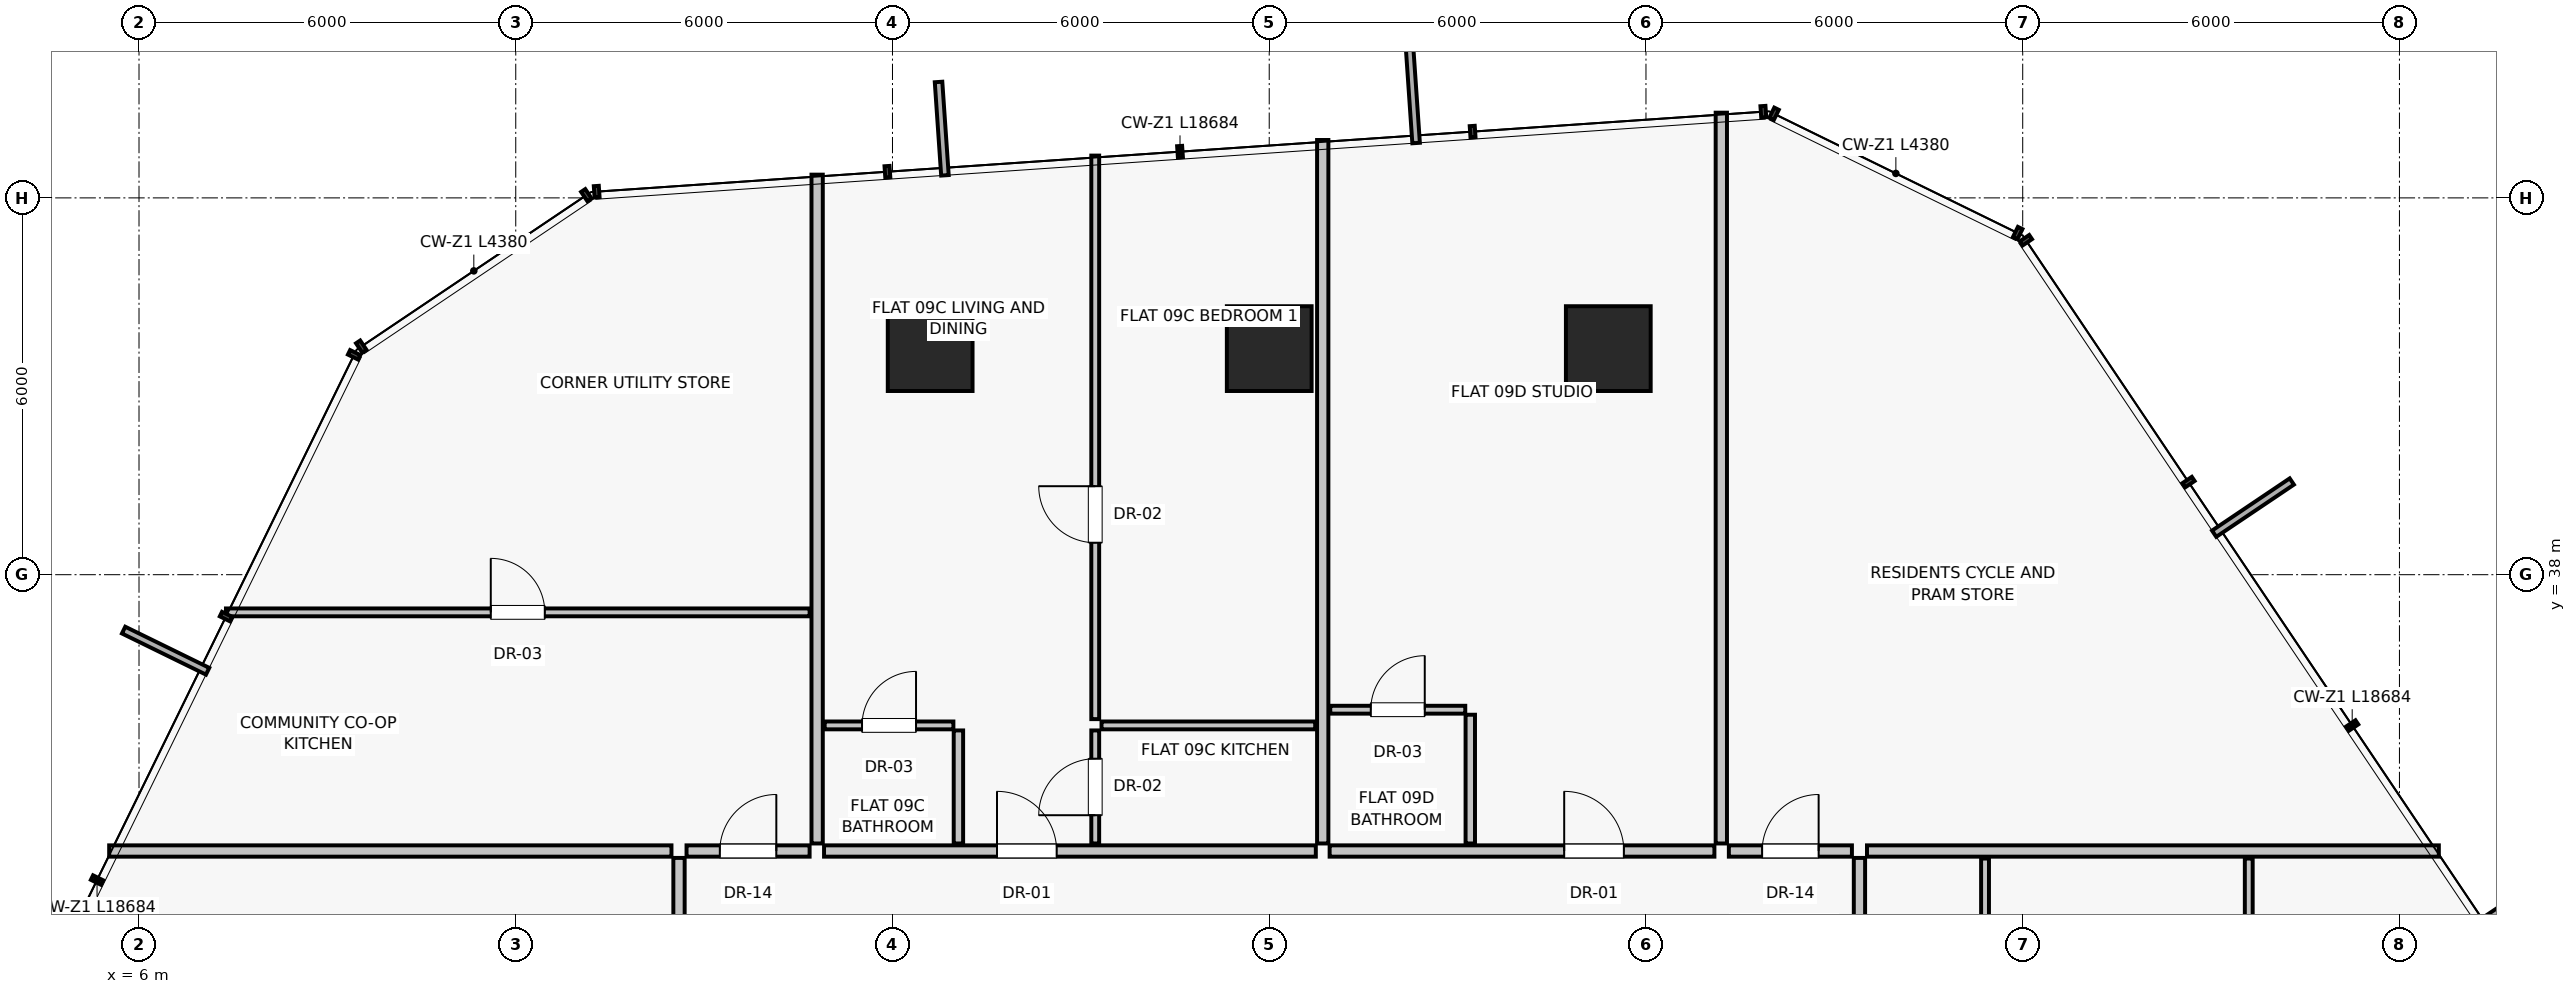
"""IFC4 building model, lengths in metres.
Left out: names, types, materials, properties, quantities, classifications, styles, units other than length and angle.
Written with IfcOpenShell. Run it as: python <this file> out.ifc"""

import sys

from ifc_helpers import new_model, si_unit, direction, frame, frame_2d, origin, origin_2d, place, context, subcontext, project, spatial, rectangle, extrude, source, transform, mapped, element, fill, save


model = new_model("IFC4")
c1 = context("Model", 3, precision=1e-05, world=origin(), true_north=direction((0.0, 1.0)))
c2 = subcontext(c1, "Body", "Model", "MODEL_VIEW")
j1 = project(units=[si_unit("LENGTHUNIT", "METRE"), si_unit("PLANEANGLEUNIT", "RADIAN")], contexts=[c1])
p1 = place(None, origin())
s1 = spatial("IfcSite", under=j1, at=p1, CompositionType="ELEMENT")
p2 = place(p1, origin())
s2 = spatial("IfcBuilding", under=s1, at=p2, CompositionType="ELEMENT")
p3 = place(p2, frame((0.0, 0.0, 37.05)))
s3 = spatial("IfcBuildingStorey", under=s2, at=p3, CompositionType="ELEMENT", Elevation=37.05)
for number, where, z_axis, x_axis in (
    (1, (29.4, 41.6, 0.0), (0.0, 0.0, 1.0), (1.0, 0.0, 0.0)),
    (2, (24.0, 41.6, 0.0), (0.0, 0.0, 1.0), (1.0, 0.0, 0.0)),
    (3, (18.6, 41.6, 0.0), (0.0, 0.0, 1.0), (1.0, 0.0, 0.0)),
):
    element("IfcColumn", number, at=place(p3, frame(where, z_axis=z_axis, x_axis=x_axis)), inside=s3, PredefinedType="COLUMN", context=c2, shape_type="SweptSolid", body=[
        extrude(rectangle(XDim=1.35, YDim=1.35, at=origin_2d()), origin(), (0.0, 0.0, 1.0), 3.25),
    ])
p4 = place(p3, frame((16.8, 33.72, 0.0), z_axis=(0.0, 0.0, 1.0), x_axis=(0.0, 1.0, 0.0)))
e4 = element("IfcWall", 4, at=p4, inside=s3, PredefinedType="PARTITIONING", context=c2, shape_type="SweptSolid", body=[
    extrude(rectangle(XDim=10.65, YDim=0.18, at=frame_2d((5.325, 0.0))), origin(), (0.0, 0.0, 1.0), 3.0),
])
p5 = place(p3, frame((31.2, 33.72, 0.0), z_axis=(0.0, 0.0, 1.0), x_axis=(0.0, 1.0, 0.0)))
e5 = element("IfcWall", 5, at=p5, inside=s3, PredefinedType="PARTITIONING", context=c2, shape_type="SweptSolid", body=[
    extrude(rectangle(XDim=11.637, YDim=0.18, at=frame_2d((5.818, 0.0))), origin(), (0.0, 0.0, 1.0), 3.0),
])
p6 = place(p3, frame((16.91, 33.6, 0.0), z_axis=(0.0, 0.0, 1.0), x_axis=(1.0, 0.0, 0.0)))
e6 = element("IfcWall", 6, at=p6, inside=s3, PredefinedType="PARTITIONING", context=c2, shape_type="SweptSolid", body=[
    extrude(rectangle(XDim=7.832, YDim=0.18, at=frame_2d((3.916, 0.0))), origin(), (0.0, 0.0, 1.0), 3.0),
])
p7 = place(p6, frame((2.754, 0.0, 0.0)))
e7 = element("IfcOpeningElement", 7, at=p7, cuts=e6, PredefinedType="OPENING", context=c2, shape_type="SweptSolid", body=[
    extrude(rectangle(XDim=0.95, YDim=2.02, at=frame_2d((0.475, 1.01))), frame((0.0, 0.1, 0.0), z_axis=(0.0, -1.0, 0.0), x_axis=(1.0, 0.0, 0.0)), (0.0, 0.0, 1.0), 0.2),
])
p8 = place(p3, frame((19.05, 33.72, 0.0), z_axis=(0.0, 0.0, 1.0), x_axis=(0.0, 1.0, 0.0)))
e8 = element("IfcWall", 8, at=p8, inside=s3, PredefinedType="PARTITIONING", context=c2, shape_type="SweptSolid", body=[
    extrude(rectangle(XDim=1.8, YDim=0.15, at=frame_2d((0.9, 0.0))), origin(), (0.0, 0.0, 1.0), 3.0),
])
p9 = place(p3, frame((16.92, 35.6, 0.0), z_axis=(0.0, 0.0, 1.0), x_axis=(1.0, 0.0, 0.0)))
e9 = element("IfcWall", 9, at=p9, inside=s3, PredefinedType="PARTITIONING", context=c2, shape_type="SweptSolid", body=[
    extrude(rectangle(XDim=2.05, YDim=0.125, at=frame_2d((1.025, 0.0))), origin(), (0.0, 0.0, 1.0), 3.0),
])
p10 = place(p9, frame((0.595, 0.0, 0.0)))
e10 = element("IfcOpeningElement", 10, at=p10, cuts=e9, PredefinedType="OPENING", context=c2, shape_type="SweptSolid", body=[
    extrude(rectangle(XDim=0.86, YDim=2.01, at=frame_2d((0.43, 1.005))), frame((0.0, 0.073, 0.0), z_axis=(0.0, -1.0, 0.0), x_axis=(1.0, 0.0, 0.0)), (0.0, 0.0, 1.0), 0.145),
])
p11 = place(p3, frame((21.229, 33.72, 0.0), z_axis=(0.0, 0.0, 1.0), x_axis=(0.0, 1.0, 0.0)))
e11 = element("IfcWall", 11, at=p11, inside=s3, PredefinedType="PARTITIONING", context=c2, shape_type="SweptSolid", body=[
    extrude(rectangle(XDim=1.8, YDim=0.125, at=frame_2d((0.9, 0.0))), origin(), (0.0, 0.0, 1.0), 3.0),
])
p12 = place(p11, frame((0.45, 0.0, 0.0)))
e12 = element("IfcOpeningElement", 12, at=p12, cuts=e11, PredefinedType="OPENING", context=c2, shape_type="SweptSolid", body=[
    extrude(rectangle(XDim=0.9, YDim=2.01, at=frame_2d((0.45, 1.005))), frame((0.0, 0.073, 0.0), z_axis=(0.0, -1.0, 0.0), x_axis=(1.0, 0.0, 0.0)), (0.0, 0.0, 1.0), 0.145),
])
p13 = place(p3, frame((21.329, 35.6, 0.0), z_axis=(0.0, 0.0, 1.0), x_axis=(1.0, 0.0, 0.0)))
e13 = element("IfcWall", 13, at=p13, inside=s3, PredefinedType="PARTITIONING", context=c2, shape_type="SweptSolid", body=[
    extrude(rectangle(XDim=3.403, YDim=0.125, at=frame_2d((1.701, 0.0))), origin(), (0.0, 0.0, 1.0), 3.0),
])
p14 = place(p3, frame((21.229, 35.7, 0.0), z_axis=(0.0, 0.0, 1.0), x_axis=(0.0, 1.0, 0.0)))
e14 = element("IfcWall", 14, at=p14, inside=s3, PredefinedType="PARTITIONING", context=c2, shape_type="SweptSolid", body=[
    extrude(rectangle(XDim=8.974, YDim=0.125, at=frame_2d((4.487, 0.0))), origin(), (0.0, 0.0, 1.0), 3.0),
])
p15 = place(p14, frame((2.809, 0.0, 0.0)))
e15 = element("IfcOpeningElement", 15, at=p15, cuts=e14, PredefinedType="OPENING", context=c2, shape_type="SweptSolid", body=[
    extrude(rectangle(XDim=0.9, YDim=2.01, at=frame_2d((0.45, 1.005))), frame((0.0, 0.073, 0.0), z_axis=(0.0, -1.0, 0.0), x_axis=(1.0, 0.0, 0.0)), (0.0, 0.0, 1.0), 0.145),
])
p16 = place(p3, frame((24.852, 33.72, 0.0), z_axis=(0.0, 0.0, 1.0), x_axis=(0.0, 1.0, 0.0)))
e16 = element("IfcWall", 16, at=p16, inside=s3, PredefinedType="PARTITIONING", context=c2, shape_type="SweptSolid", body=[
    extrude(rectangle(XDim=11.202, YDim=0.18, at=frame_2d((5.601, 0.0))), origin(), (0.0, 0.0, 1.0), 3.0),
])
p17 = place(p3, frame((24.962, 33.6, 0.0), z_axis=(0.0, 0.0, 1.0), x_axis=(1.0, 0.0, 0.0)))
e17 = element("IfcWall", 17, at=p17, inside=s3, PredefinedType="PARTITIONING", context=c2, shape_type="SweptSolid", body=[
    extrude(rectangle(XDim=6.128, YDim=0.18, at=frame_2d((3.064, 0.0))), origin(), (0.0, 0.0, 1.0), 3.0),
])
p18 = place(p17, frame((3.736, 0.0, 0.0)))
e18 = element("IfcOpeningElement", 18, at=p18, cuts=e17, PredefinedType="OPENING", context=c2, shape_type="SweptSolid", body=[
    extrude(rectangle(XDim=0.95, YDim=2.02, at=frame_2d((0.475, 1.01))), frame((0.0, 0.1, 0.0), z_axis=(0.0, -1.0, 0.0), x_axis=(1.0, 0.0, 0.0)), (0.0, 0.0, 1.0), 0.2),
])
p19 = place(p3, frame((27.202, 33.72, 0.0), z_axis=(0.0, 0.0, 1.0), x_axis=(0.0, 1.0, 0.0)))
e19 = element("IfcWall", 19, at=p19, inside=s3, PredefinedType="PARTITIONING", context=c2, shape_type="SweptSolid", body=[
    extrude(rectangle(XDim=2.05, YDim=0.15, at=frame_2d((1.025, 0.0))), origin(), (0.0, 0.0, 1.0), 3.0),
])
p20 = place(p3, frame((24.972, 35.85, 0.0), z_axis=(0.0, 0.0, 1.0), x_axis=(1.0, 0.0, 0.0)))
e20 = element("IfcWall", 20, at=p20, inside=s3, PredefinedType="PARTITIONING", context=c2, shape_type="SweptSolid", body=[
    extrude(rectangle(XDim=2.15, YDim=0.125, at=frame_2d((1.075, 0.0))), origin(), (0.0, 0.0, 1.0), 3.0),
])
p21 = place(p20, frame((0.645, 0.0, 0.0)))
e21 = element("IfcOpeningElement", 21, at=p21, cuts=e20, PredefinedType="OPENING", context=c2, shape_type="SweptSolid", body=[
    extrude(rectangle(XDim=0.86, YDim=2.01, at=frame_2d((0.43, 1.005))), frame((0.0, 0.073, 0.0), z_axis=(0.0, -1.0, 0.0), x_axis=(1.0, 0.0, 0.0)), (0.0, 0.0, 1.0), 0.145),
])
p22 = place(p3, frame((14.48, 33.6, 0.0), z_axis=(0.0, 0.0, 1.0), x_axis=(-1.0, 0.0, 0.0)))
e22 = element("IfcWall", 22, at=p22, inside=s3, PredefinedType="PARTITIONING", context=c2, shape_type="SweptSolid", body=[
    extrude(rectangle(XDim=8.955, YDim=0.18, at=frame_2d((4.478, 0.0))), origin(), (0.0, 0.0, 1.0), 3.0),
])
p23 = place(p3, frame((14.6, 28.073, 0.0), z_axis=(0.0, 0.0, 1.0), x_axis=(0.0, 1.0, 0.0)))
e23 = element("IfcWall", 23, at=p23, inside=s3, PredefinedType="PARTITIONING", context=c2, shape_type="SweptSolid", body=[
    extrude(rectangle(XDim=5.417, YDim=0.18, at=frame_2d((2.708, 0.0))), origin(), (0.0, 0.0, 1.0), 3.0),
])
p24 = place(p23, frame((2.208, 0.0, 0.0)))
e24 = element("IfcOpeningElement", 24, at=p24, cuts=e23, PredefinedType="OPENING", context=c2, shape_type="SweptSolid", body=[
    extrude(rectangle(XDim=1.0, YDim=2.01, at=frame_2d((0.5, 1.005))), frame((0.0, 0.1, 0.0), z_axis=(0.0, -1.0, 0.0), x_axis=(1.0, 0.0, 0.0)), (0.0, 0.0, 1.0), 0.2),
])
p25 = place(p3, frame((33.52, 33.6, 0.0), z_axis=(0.0, 0.0, 1.0), x_axis=(1.0, 0.0, 0.0)))
e25 = element("IfcWall", 25, at=p25, inside=s3, PredefinedType="PARTITIONING", context=c2, shape_type="SweptSolid", body=[
    extrude(rectangle(XDim=9.107, YDim=0.18, at=frame_2d((4.554, 0.0))), origin(), (0.0, 0.0, 1.0), 3.0),
])
p26 = place(p3, frame((33.4, 24.618, 0.0), z_axis=(0.0, 0.0, 1.0), x_axis=(0.0, 1.0, 0.0)))
e26 = element("IfcWall", 26, at=p26, inside=s3, PredefinedType="PARTITIONING", context=c2, shape_type="SweptSolid", body=[
    extrude(rectangle(XDim=8.872, YDim=0.18, at=frame_2d((4.436, 0.0))), origin(), (0.0, 0.0, 1.0), 3.0),
])
p27 = place(p26, frame((2.995, 0.0, 0.0)))
e27 = element("IfcOpeningElement", 27, at=p27, cuts=e26, PredefinedType="OPENING", context=c2, shape_type="SweptSolid", body=[
    extrude(rectangle(XDim=0.95, YDim=2.02, at=frame_2d((0.475, 1.01))), frame((0.0, 0.1, 0.0), z_axis=(0.0, -1.0, 0.0), x_axis=(1.0, 0.0, 0.0)), (0.0, 0.0, 1.0), 0.2),
])
for number, where, z_axis, x_axis in (
    (28, (35.4, 29.518, 0.0), (0.0, 0.0, 1.0), (0.0, 1.0, 0.0)),
    (29, (39.6, 29.518, 0.0), (0.0, 0.0, 1.0), (0.0, 1.0, 0.0)),
):
    element("IfcWall", number, at=place(p3, frame(where, z_axis=z_axis, x_axis=x_axis)), inside=s3, PredefinedType="PARTITIONING", context=c2, shape_type="SweptSolid", body=[
        extrude(rectangle(XDim=3.962, YDim=0.125, at=frame_2d((1.981, 0.0))), origin(), (0.0, 0.0, 1.0), 3.0),
    ])
p28 = place(p3, frame((14.72, 33.6, 0.0), z_axis=(0.0, 0.0, 1.0), x_axis=(1.0, 0.0, 0.0)))
e30 = element("IfcWall", 30, at=p28, inside=s3, PredefinedType="PARTITIONING", context=c2, shape_type="SweptSolid", body=[
    extrude(rectangle(XDim=1.96, YDim=0.18, at=frame_2d((0.98, 0.0))), origin(), (0.0, 0.0, 1.0), 3.0),
])
p29 = place(p28, frame((0.53, 0.0, 0.0)))
e31 = element("IfcOpeningElement", 31, at=p29, cuts=e30, PredefinedType="OPENING", context=c2, shape_type="SweptSolid", body=[
    extrude(rectangle(XDim=0.9, YDim=2.01, at=frame_2d((0.45, 1.005))), frame((0.0, 0.1, 0.0), z_axis=(0.0, -1.0, 0.0), x_axis=(1.0, 0.0, 0.0)), (0.0, 0.0, 1.0), 0.2),
])
p30 = place(p3, frame((7.385, 37.4, 0.0), z_axis=(0.0, 0.0, 1.0), x_axis=(1.0, 0.0, 0.0)))
e32 = element("IfcWall", 32, at=p30, inside=s3, PredefinedType="PARTITIONING", context=c2, shape_type="SweptSolid", body=[
    extrude(rectangle(XDim=9.295, YDim=0.125, at=frame_2d((4.648, 0.0))), origin(), (0.0, 0.0, 1.0), 3.0),
])
p31 = place(p30, frame((4.218, 0.0, 0.0)))
e33 = element("IfcOpeningElement", 33, at=p31, cuts=e32, PredefinedType="OPENING", context=c2, shape_type="SweptSolid", body=[
    extrude(rectangle(XDim=0.86, YDim=2.01, at=frame_2d((0.43, 1.005))), frame((0.0, 0.073, 0.0), z_axis=(0.0, -1.0, 0.0), x_axis=(1.0, 0.0, 0.0)), (0.0, 0.0, 1.0), 0.145),
])
p32 = place(p3, frame((31.32, 33.6, 0.0), z_axis=(0.0, 0.0, 1.0), x_axis=(1.0, 0.0, 0.0)))
e34 = element("IfcWall", 34, at=p32, inside=s3, PredefinedType="PARTITIONING", context=c2, shape_type="SweptSolid", body=[
    extrude(rectangle(XDim=1.96, YDim=0.18, at=frame_2d((0.98, 0.0))), origin(), (0.0, 0.0, 1.0), 3.0),
])
p33 = place(p32, frame((0.53, 0.0, 0.0)))
e35 = element("IfcOpeningElement", 35, at=p33, cuts=e34, PredefinedType="OPENING", context=c2, shape_type="SweptSolid", body=[
    extrude(rectangle(XDim=0.9, YDim=2.01, at=frame_2d((0.45, 1.005))), frame((0.0, 0.1, 0.0), z_axis=(0.0, -1.0, 0.0), x_axis=(1.0, 0.0, 0.0)), (0.0, 0.0, 1.0), 0.2),
])
m1 = source(origin(), c2, "Body", "SweptSolid", [
    extrude(rectangle(XDim=0.95, YDim=2.02, at=frame_2d((0.475, 1.01))), frame((0.0, 0.025, 0.0), z_axis=(0.0, -1.0, 0.0), x_axis=(1.0, 0.0, 0.0)), (0.0, 0.0, 1.0), 0.05),
])
p34 = place(p7, origin())
e36 = element("IfcDoor", 36, at=p34, inside=s3, OperationType="SINGLE_SWING_LEFT", PredefinedType="DOOR", context=c2, shape_type="MappedRepresentation", body=[
    mapped(m1, transform((0.0, 0.0, 0.0), scale=1.0)),
])
fill(e7, e36)
m2 = source(origin(), c2, "Body", "SweptSolid", [
    extrude(rectangle(XDim=0.86, YDim=2.01, at=frame_2d((0.43, 1.005))), frame((0.0, 0.025, 0.0), z_axis=(0.0, -1.0, 0.0), x_axis=(1.0, 0.0, 0.0)), (0.0, 0.0, 1.0), 0.05),
])
p35 = place(p10, origin())
e37 = element("IfcDoor", 37, at=p35, inside=s3, OperationType="SINGLE_SWING_RIGHT", PredefinedType="DOOR", context=c2, shape_type="MappedRepresentation", body=[
    mapped(m2, transform((0.0, 0.0, 0.0), scale=1.0)),
])
fill(e10, e37)
m3 = source(origin(), c2, "Body", "SweptSolid", [
    extrude(rectangle(XDim=0.9, YDim=2.01, at=frame_2d((0.45, 1.005))), frame((0.0, 0.025, 0.0), z_axis=(0.0, -1.0, 0.0), x_axis=(1.0, 0.0, 0.0)), (0.0, 0.0, 1.0), 0.05),
])
p36 = place(p12, origin())
e38 = element("IfcDoor", 38, at=p36, inside=s3, OperationType="SINGLE_SWING_LEFT", PredefinedType="DOOR", context=c2, shape_type="MappedRepresentation", body=[
    mapped(m3, transform((0.0, 0.0, 0.0), scale=1.0)),
])
fill(e12, e38)
p37 = place(p15, origin())
e39 = element("IfcDoor", 39, at=p37, inside=s3, OperationType="SINGLE_SWING_RIGHT", PredefinedType="DOOR", context=c2, shape_type="MappedRepresentation", body=[
    mapped(m3, transform((0.0, 0.0, 0.0), scale=1.0)),
])
fill(e15, e39)
p38 = place(p18, origin())
e40 = element("IfcDoor", 40, at=p38, inside=s3, OperationType="SINGLE_SWING_LEFT", PredefinedType="DOOR", context=c2, shape_type="MappedRepresentation", body=[
    mapped(m1, transform((0.0, 0.0, 0.0), scale=1.0)),
])
fill(e18, e40)
p39 = place(p21, origin())
e41 = element("IfcDoor", 41, at=p39, inside=s3, OperationType="SINGLE_SWING_RIGHT", PredefinedType="DOOR", context=c2, shape_type="MappedRepresentation", body=[
    mapped(m2, transform((0.0, 0.0, 0.0), scale=1.0)),
])
fill(e21, e41)
p40 = place(p29, origin())
e42 = element("IfcDoor", 42, at=p40, inside=s3, OperationType="SINGLE_SWING_RIGHT", PredefinedType="DOOR", context=c2, shape_type="MappedRepresentation", body=[
    mapped(m3, transform((0.0, 0.0, 0.0), scale=1.0)),
])
fill(e31, e42)
p41 = place(p31, origin())
e43 = element("IfcDoor", 43, at=p41, inside=s3, OperationType="SINGLE_SWING_LEFT", PredefinedType="DOOR", context=c2, shape_type="MappedRepresentation", body=[
    mapped(m2, transform((0.0, 0.0, 0.0), scale=1.0)),
])
fill(e33, e43)
p42 = place(p33, origin())
e44 = element("IfcDoor", 44, at=p42, inside=s3, OperationType="SINGLE_SWING_RIGHT", PredefinedType="DOOR", context=c2, shape_type="MappedRepresentation", body=[
    mapped(m3, transform((0.0, 0.0, 0.0), scale=1.0)),
])
fill(e35, e44)
save(model, sys.argv[1])
